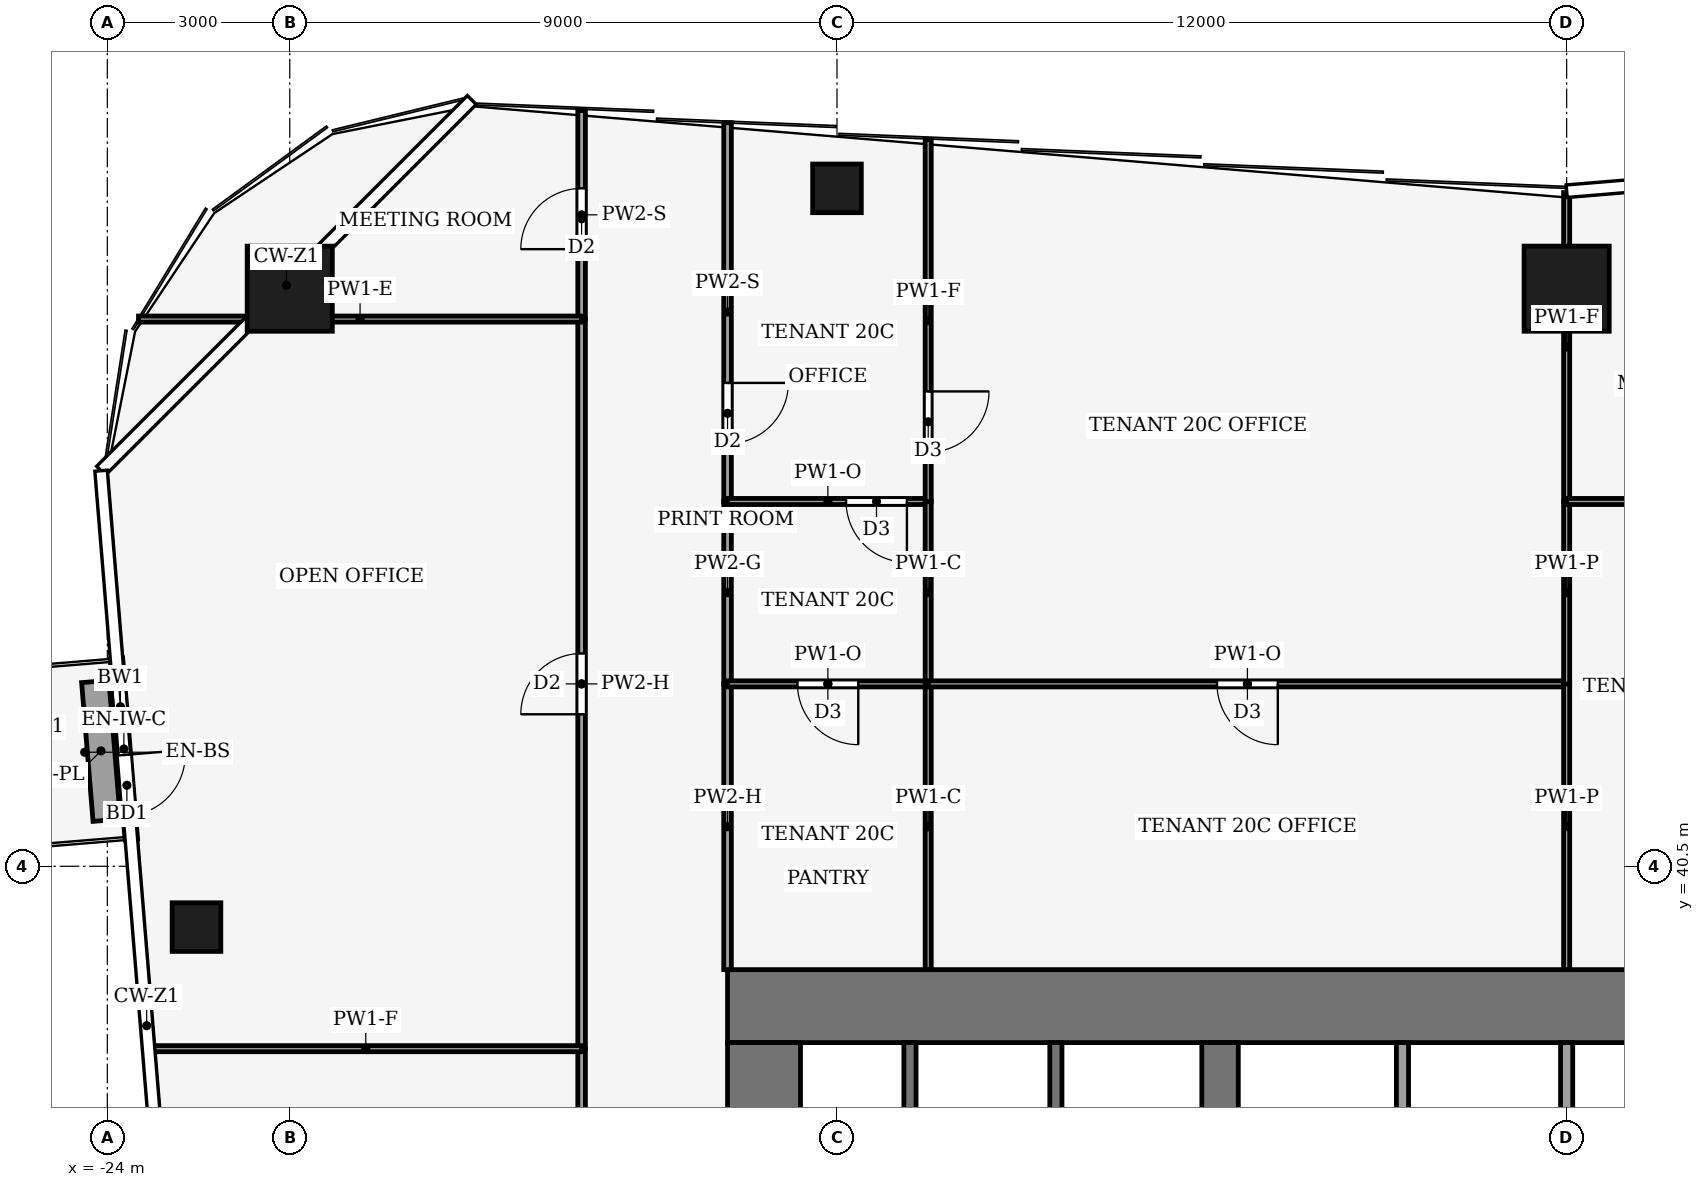
"""IFC4 building model, lengths in metres.
Left out: names, types, materials, properties, quantities, classifications, styles, units other than length and angle.
Written with IfcOpenShell. Run it as: python <this file> out.ifc"""

import sys

from ifc_helpers import new_model, si_unit, direction, frame, frame_2d, origin, origin_2d, place, context, subcontext, project, spatial, rectangle, hollow_rectangle, extrude, element, fill, save


model = new_model("IFC4")
c1 = context("Model", 3, precision=1e-05, world=origin(), true_north=direction((0.0, 1.0)))
c2 = subcontext(c1, "Body", "Model", "MODEL_VIEW")
j1 = project(units=[si_unit("LENGTHUNIT", "METRE"), si_unit("PLANEANGLEUNIT", "RADIAN")], contexts=[c1])
p1 = place(None, origin())
s1 = spatial("IfcSite", under=j1, at=p1, CompositionType="ELEMENT")
p2 = place(p1, origin())
s2 = spatial("IfcBuilding", under=s1, at=p2, CompositionType="ELEMENT")
p3 = place(p2, frame((0.0, 0.0, 90.0)))
s3 = spatial("IfcBuildingStorey", under=s2, at=p3, CompositionType="ELEMENT", Elevation=90.0)
p4 = place(p3, frame((-13.8, 38.2, -0.13), z_axis=(0.0, 0.0, 1.0), x_axis=(1.0, 0.0, 0.0)))
e1 = element("IfcWall", 1, at=p4, inside=s3, PredefinedType="SHEAR", context=c2, shape_type="SweptSolid", body=[
    extrude(rectangle(XDim=27.6, YDim=1.2, at=frame_2d((13.8, 0.0))), origin(), (0.0, 0.0, 1.0), 4.0),
])
p5 = place(p3, frame((-13.2, 18.4, -0.13), z_axis=(0.0, 0.0, 1.0), x_axis=(0.0, 1.0, 0.0)))
e2 = element("IfcWall", 2, at=p5, inside=s3, PredefinedType="SHEAR", context=c2, shape_type="SweptSolid", body=[
    extrude(rectangle(XDim=19.2, YDim=1.2, at=frame_2d((9.6, 0.0))), origin(), (0.0, 0.0, 1.0), 4.0),
])
p6 = place(p5, frame((2.8, 0.0, 0.13)))
e3 = element("IfcOpeningElement", 3, at=p6, cuts=e2, PredefinedType="OPENING", context=c2, shape_type="SweptSolid", body=[
    extrude(rectangle(XDim=2.4, YDim=2.4, at=frame_2d((1.2, 1.2))), frame((0.0, 0.61, 0.0), z_axis=(0.0, -1.0, 0.0), x_axis=(1.0, 0.0, 0.0)), (0.0, 0.0, 1.0), 1.22),
])
p7 = place(p5, frame((13.4, 0.0, 0.13)))
e4 = element("IfcOpeningElement", 4, at=p7, cuts=e2, PredefinedType="OPENING", context=c2, shape_type="SweptSolid", body=[
    extrude(rectangle(XDim=1.4, YDim=2.2, at=frame_2d((0.7, 1.1))), frame((0.0, 0.61, 0.0), z_axis=(0.0, -1.0, 0.0), x_axis=(1.0, 0.0, 0.0)), (0.0, 0.0, 1.0), 1.22),
])
p8 = place(p3, frame((-5.7, 18.4, -0.13), z_axis=(0.0, 0.0, 1.0), x_axis=(0.0, 1.0, 0.0)))
e5 = element("IfcWall", 5, at=p8, inside=s3, PredefinedType="SHEAR", context=c2, shape_type="SweptSolid", body=[
    extrude(rectangle(XDim=19.2, YDim=0.6, at=frame_2d((9.6, 0.0))), origin(), (0.0, 0.0, 1.0), 4.0),
])
p9 = place(p8, frame((8.35, 0.0, 0.13)))
e6 = element("IfcOpeningElement", 6, at=p9, cuts=e5, PredefinedType="OPENING", context=c2, shape_type="SweptSolid", body=[
    extrude(rectangle(XDim=0.9, YDim=2.1, at=frame_2d((0.45, 1.05))), frame((0.0, 0.31, 0.0), z_axis=(0.0, -1.0, 0.0), x_axis=(1.0, 0.0, 0.0)), (0.0, 0.0, 1.0), 0.62),
])
for number, where, z_axis, x_axis in (
    (7, (-21.0, 50.0, 0.0), (0.0, 0.0, 1.0), (1.0, 0.0, 0.0)),
    (8, (0.0, 50.0, 0.0), (0.0, 0.0, 1.0), (1.0, 0.0, 0.0)),
):
    element("IfcColumn", number, at=place(p3, frame(where, z_axis=z_axis, x_axis=x_axis)), inside=s3, PredefinedType="COLUMN", context=c2, shape_type="SweptSolid", body=[
        extrude(hollow_rectangle(XDim=1.4, YDim=1.4, WallThickness=0.08, at=origin_2d()), origin(), (0.0, 0.0, 1.0), 4.0),
    ])
for number, where, z_axis, x_axis in (
    (9, (-12.0, 51.65, 0.0), (0.0, 0.0, 1.0), (1.0, 0.0, 0.0)),
    (10, (-22.534, 39.5, 0.0), (0.0, 0.0, 1.0), (1.0, 0.0, 0.0)),
):
    element("IfcColumn", number, at=place(p3, frame(where, z_axis=z_axis, x_axis=x_axis)), inside=s3, PredefinedType="COLUMN", context=c2, shape_type="SweptSolid", body=[
        extrude(hollow_rectangle(XDim=0.8, YDim=0.8, WallThickness=0.04, at=origin_2d()), origin(), (0.0, 0.0, 1.0), 4.0),
    ])
p10 = place(p3, frame((-23.85, 43.919, 0.0), z_axis=(0.0, 0.0, 1.0), x_axis=(0.081903334605, -0.996640278024, 0.0)))
e11 = element("IfcWall", 11, at=p10, inside=s3, PredefinedType="SOLIDWALL", context=c2, shape_type="SweptSolid", body=[
    extrude(rectangle(XDim=2.99, YDim=0.206, at=frame_2d((1.495, 0.0))), origin(), (0.0, 0.0, 1.0), 3.65),
])
p11 = place(p10, frame((1.593, 0.0, 0.0)))
e12 = element("IfcOpeningElement", 12, at=p11, cuts=e11, PredefinedType="OPENING", context=c2, shape_type="SweptSolid", body=[
    extrude(rectangle(XDim=1.0, YDim=2.1, at=frame_2d((0.5, 1.05))), frame((0.0, 0.113, 0.0), z_axis=(0.0, -1.0, 0.0), x_axis=(1.0, 0.0, 0.0)), (0.0, 0.0, 1.0), 0.226),
])
p12 = place(p10, frame((0.396, 0.0, 0.9)))
e13 = element("IfcOpeningElement", 13, at=p12, cuts=e11, PredefinedType="OPENING", context=c2, shape_type="SweptSolid", body=[
    extrude(rectangle(XDim=0.8, YDim=1.2, at=frame_2d((0.4, 0.6))), frame((0.0, 0.113, 0.0), z_axis=(0.0, -1.0, 0.0), x_axis=(1.0, 0.0, 0.0)), (0.0, 0.0, 1.0), 0.226),
])
p13 = place(p3, frame((-24.198, 43.539, 0.0), z_axis=(0.0, 0.0, 1.0), x_axis=(0.081986639556, -0.996633428566, 0.0)))
e14 = element("IfcWall", 14, at=p13, inside=s3, PredefinedType="USERDEFINED", context=c2, shape_type="SweptSolid", body=[
    extrude(rectangle(XDim=2.29, YDim=0.45, at=frame_2d((1.145, 0.0))), origin(), (0.0, 0.0, 1.0), 0.4),
])
for number, where, z_axis, x_axis in (
    (15, (-10.8, 34.0, 0.0), (0.0, 0.0, 1.0), (0.0, 1.0, 0.0)),
    (16, (-8.4, 34.0, 0.0), (0.0, 0.0, 1.0), (0.0, 1.0, 0.0)),
    (17, (-2.7, 34.0, 0.0), (0.0, 0.0, 1.0), (0.0, 1.0, 0.0)),
    (18, (0.0, 34.0, 0.0), (0.0, 0.0, 1.0), (0.0, 1.0, 0.0)),
):
    element("IfcWall", number, at=place(p3, frame(where, z_axis=z_axis, x_axis=x_axis)), inside=s3, PredefinedType="PARTITIONING", context=c2, shape_type="SweptSolid", body=[
        extrude(rectangle(XDim=3.6, YDim=0.2, at=frame_2d((1.8, 0.0))), origin(), (0.0, 0.0, 1.0), 3.87),
    ])
p14 = place(p3, frame((-16.2, 25.5, 0.0), z_axis=(0.0, 0.0, 1.0), x_axis=(0.0, 1.0, 0.0)))
e19 = element("IfcWall", 19, at=p14, inside=s3, PredefinedType="PARTITIONING", context=c2, shape_type="SweptSolid", body=[
    extrude(rectangle(XDim=12.0, YDim=0.125, at=frame_2d((6.0, 0.0))), origin(), (0.0, 0.0, 1.0), 3.48),
])
p15 = place(p14, frame((5.5, 0.0, 0.0)))
e20 = element("IfcOpeningElement", 20, at=p15, cuts=e19, PredefinedType="OPENING", context=c2, shape_type="SweptSolid", body=[
    extrude(rectangle(XDim=1.0, YDim=2.1, at=frame_2d((0.5, 1.05))), frame((0.0, 0.073, 0.0), z_axis=(0.0, -1.0, 0.0), x_axis=(1.0, 0.0, 0.0)), (0.0, 0.0, 1.0), 0.145),
])
p16 = place(p3, frame((-16.2, 37.5, 0.0), z_axis=(0.0, 0.0, 1.0), x_axis=(0.0, 1.0, 0.0)))
e21 = element("IfcWall", 21, at=p16, inside=s3, PredefinedType="PARTITIONING", context=c2, shape_type="SweptSolid", body=[
    extrude(rectangle(XDim=12.0, YDim=0.125, at=frame_2d((6.0, 0.0))), origin(), (0.0, 0.0, 1.0), 3.14),
])
p17 = place(p16, frame((5.5, 0.0, 0.0)))
e22 = element("IfcOpeningElement", 22, at=p17, cuts=e21, PredefinedType="OPENING", context=c2, shape_type="SweptSolid", body=[
    extrude(rectangle(XDim=1.0, YDim=2.1, at=frame_2d((0.5, 1.05))), frame((0.0, 0.073, 0.0), z_axis=(0.0, -1.0, 0.0), x_axis=(1.0, 0.0, 0.0)), (0.0, 0.0, 1.0), 0.145),
])
p18 = place(p3, frame((-16.2, 49.5, 0.0), z_axis=(0.0, 0.0, 1.0), x_axis=(0.0, 1.0, 0.0)))
e23 = element("IfcWall", 23, at=p18, inside=s3, PredefinedType="PARTITIONING", context=c2, shape_type="SweptSolid", body=[
    extrude(rectangle(XDim=3.43, YDim=0.125, at=frame_2d((1.715, 0.0))), origin(), (0.0, 0.0, 1.0), 3.04),
])
p19 = place(p18, frame((1.15, 0.0, 0.0)))
e24 = element("IfcOpeningElement", 24, at=p19, cuts=e23, PredefinedType="OPENING", context=c2, shape_type="SweptSolid", body=[
    extrude(rectangle(XDim=1.0, YDim=2.1, at=frame_2d((0.5, 1.05))), frame((0.0, 0.073, 0.0), z_axis=(0.0, -1.0, 0.0), x_axis=(1.0, 0.0, 0.0)), (0.0, 0.0, 1.0), 0.145),
])
p20 = place(p3, frame((-13.8, 38.8, 0.0), z_axis=(0.0, 0.0, 1.0), x_axis=(0.0, 1.0, 0.0)))
e25 = element("IfcWall", 25, at=p20, inside=s3, PredefinedType="PARTITIONING", context=c2, shape_type="SweptSolid", body=[
    extrude(rectangle(XDim=4.7, YDim=0.125, at=frame_2d((2.35, 0.0))), origin(), (0.0, 0.0, 1.0), 3.14),
])
p21 = place(p3, frame((-13.8, 43.5, 0.0), z_axis=(0.0, 0.0, 1.0), x_axis=(0.0, 1.0, 0.0)))
e26 = element("IfcWall", 26, at=p21, inside=s3, PredefinedType="PARTITIONING", context=c2, shape_type="SweptSolid", body=[
    extrude(rectangle(XDim=3.0, YDim=0.125, at=frame_2d((1.5, 0.0))), origin(), (0.0, 0.0, 1.0), 3.87),
])
p22 = place(p3, frame((-13.8, 52.73, 0.0), z_axis=(0.0, 0.0, 1.0), x_axis=(0.0, -1.0, 0.0)))
e27 = element("IfcWall", 27, at=p22, inside=s3, PredefinedType="PARTITIONING", context=c2, shape_type="SweptSolid", body=[
    extrude(rectangle(XDim=6.23, YDim=0.125, at=frame_2d((3.115, 0.0))), origin(), (0.0, 0.0, 1.0), 3.04),
])
p23 = place(p22, frame((4.28, 0.0, 0.0)))
e28 = element("IfcOpeningElement", 28, at=p23, cuts=e27, PredefinedType="OPENING", context=c2, shape_type="SweptSolid", body=[
    extrude(rectangle(XDim=1.0, YDim=2.1, at=frame_2d((0.5, 1.05))), frame((0.0, 0.073, 0.0), z_axis=(0.0, -1.0, 0.0), x_axis=(1.0, 0.0, 0.0)), (0.0, 0.0, 1.0), 0.145),
])
p24 = place(p3, frame((-16.2, 37.5, 0.0), z_axis=(0.0, 0.0, 1.0), x_axis=(-1.0, 0.0, 0.0)))
e29 = element("IfcWall", 29, at=p24, inside=s3, PredefinedType="PARTITIONING", context=c2, shape_type="SweptSolid", body=[
    extrude(rectangle(XDim=7.099, YDim=0.1, at=frame_2d((3.55, 0.0))), origin(), (0.0, 0.0, 1.0), 3.04),
])
p25 = place(p3, frame((-16.2, 49.5, 0.0), z_axis=(0.0, 0.0, 1.0), x_axis=(-1.0, 0.0, 0.0)))
e30 = element("IfcWall", 30, at=p25, inside=s3, PredefinedType="PARTITIONING", context=c2, shape_type="SweptSolid", body=[
    extrude(rectangle(XDim=7.287, YDim=0.1, at=frame_2d((3.644, 0.0))), origin(), (0.0, 0.0, 1.0), 3.34),
])
p26 = place(p3, frame((-10.5, 43.5, 0.0), z_axis=(0.0, 0.0, 1.0), x_axis=(-1.0, 0.0, 0.0)))
e31 = element("IfcWall", 31, at=p26, inside=s3, PredefinedType="PARTITIONING", context=c2, shape_type="SweptSolid", body=[
    extrude(rectangle(XDim=3.3, YDim=0.1, at=frame_2d((1.65, 0.0))), origin(), (0.0, 0.0, 1.0), 3.39),
])
p27 = place(p26, frame((1.15, 0.0, 0.0)))
e32 = element("IfcOpeningElement", 32, at=p27, cuts=e31, PredefinedType="OPENING", context=c2, shape_type="SweptSolid", body=[
    extrude(rectangle(XDim=1.0, YDim=2.1, at=frame_2d((0.5, 1.05))), frame((0.0, 0.06, 0.0), z_axis=(0.0, -1.0, 0.0), x_axis=(1.0, 0.0, 0.0)), (0.0, 0.0, 1.0), 0.12),
])
p28 = place(p3, frame((-10.5, 38.8, 0.0), z_axis=(0.0, 0.0, 1.0), x_axis=(0.0, 1.0, 0.0)))
e33 = element("IfcWall", 33, at=p28, inside=s3, PredefinedType="PARTITIONING", context=c2, shape_type="SweptSolid", body=[
    extrude(rectangle(XDim=4.7, YDim=0.1, at=frame_2d((2.35, 0.0))), origin(), (0.0, 0.0, 1.0), 3.87),
])
p29 = place(p3, frame((-10.5, 46.5, 0.0), z_axis=(0.0, 0.0, 1.0), x_axis=(-1.0, 0.0, 0.0)))
e34 = element("IfcWall", 34, at=p29, inside=s3, PredefinedType="PARTITIONING", context=c2, shape_type="SweptSolid", body=[
    extrude(rectangle(XDim=3.3, YDim=0.1, at=frame_2d((1.65, 0.0))), origin(), (0.0, 0.0, 1.0), 3.39),
])
p30 = place(p29, frame((0.35, 0.0, 0.0)))
e35 = element("IfcOpeningElement", 35, at=p30, cuts=e34, PredefinedType="OPENING", context=c2, shape_type="SweptSolid", body=[
    extrude(rectangle(XDim=1.0, YDim=2.1, at=frame_2d((0.5, 1.05))), frame((0.0, 0.06, 0.0), z_axis=(0.0, -1.0, 0.0), x_axis=(1.0, 0.0, 0.0)), (0.0, 0.0, 1.0), 0.12),
])
p31 = place(p3, frame((-10.5, 43.5, 0.0), z_axis=(0.0, 0.0, 1.0), x_axis=(0.0, 1.0, 0.0)))
e36 = element("IfcWall", 36, at=p31, inside=s3, PredefinedType="PARTITIONING", context=c2, shape_type="SweptSolid", body=[
    extrude(rectangle(XDim=3.004, YDim=0.1, at=frame_2d((1.502, 0.0))), origin(), (0.0, 0.0, 1.0), 3.87),
])
p32 = place(p3, frame((-10.5, 52.455, 0.0), z_axis=(0.0, 0.0, 1.0), x_axis=(0.0, -1.0, 0.0)))
e37 = element("IfcWall", 37, at=p32, inside=s3, PredefinedType="PARTITIONING", context=c2, shape_type="SweptSolid", body=[
    extrude(rectangle(XDim=5.959, YDim=0.1, at=frame_2d((2.979, 0.0))), origin(), (0.0, 0.0, 1.0), 3.04),
])
p33 = place(p32, frame((4.145, 0.0, 0.0)))
e38 = element("IfcOpeningElement", 38, at=p33, cuts=e37, PredefinedType="OPENING", context=c2, shape_type="SweptSolid", body=[
    extrude(rectangle(XDim=1.0, YDim=2.1, at=frame_2d((0.5, 1.05))), frame((0.0, 0.06, 0.0), z_axis=(0.0, -1.0, 0.0), x_axis=(1.0, 0.0, 0.0)), (0.0, 0.0, 1.0), 0.12),
])
p34 = place(p3, frame((0.0, 43.5, 0.0), z_axis=(0.0, 0.0, 1.0), x_axis=(-1.0, 0.0, 0.0)))
e39 = element("IfcWall", 39, at=p34, inside=s3, PredefinedType="PARTITIONING", context=c2, shape_type="SweptSolid", body=[
    extrude(rectangle(XDim=10.5, YDim=0.1, at=frame_2d((5.25, 0.0))), origin(), (0.0, 0.0, 1.0), 3.39),
])
p35 = place(p34, frame((4.75, 0.0, 0.0)))
e40 = element("IfcOpeningElement", 40, at=p35, cuts=e39, PredefinedType="OPENING", context=c2, shape_type="SweptSolid", body=[
    extrude(rectangle(XDim=1.0, YDim=2.1, at=frame_2d((0.5, 1.05))), frame((0.0, 0.06, 0.0), z_axis=(0.0, -1.0, 0.0), x_axis=(1.0, 0.0, 0.0)), (0.0, 0.0, 1.0), 0.12),
])
p36 = place(p3, frame((0.0, 38.8, 0.0), z_axis=(0.0, 0.0, 1.0), x_axis=(0.0, 1.0, 0.0)))
e41 = element("IfcWall", 41, at=p36, inside=s3, PredefinedType="PARTITIONING", context=c2, shape_type="SweptSolid", body=[
    extrude(rectangle(XDim=4.704, YDim=0.1, at=frame_2d((2.352, 0.0))), origin(), (0.0, 0.0, 1.0), 3.44),
])
p37 = place(p3, frame((0.0, 43.496, 0.0), z_axis=(0.0, 0.0, 1.0), x_axis=(0.0, 1.0, 0.0)))
e42 = element("IfcWall", 42, at=p37, inside=s3, PredefinedType="PARTITIONING", context=c2, shape_type="SweptSolid", body=[
    extrude(rectangle(XDim=3.004, YDim=0.1, at=frame_2d((1.502, 0.0))), origin(), (0.0, 0.0, 1.0), 3.44),
])
p38 = place(p3, frame((0.0, 46.5, 0.0), z_axis=(0.0, 0.0, 1.0), x_axis=(0.0, 1.0, 0.0)))
e43 = element("IfcWall", 43, at=p38, inside=s3, PredefinedType="PARTITIONING", context=c2, shape_type="SweptSolid", body=[
    extrude(rectangle(XDim=5.08, YDim=0.1, at=frame_2d((2.54, 0.0))), origin(), (0.0, 0.0, 1.0), 3.04),
])
p39 = place(p3, frame((4.5, 46.5, 0.0), z_axis=(0.0, 0.0, 1.0), x_axis=(-1.0, 0.0, 0.0)))
e44 = element("IfcWall", 44, at=p39, inside=s3, PredefinedType="PARTITIONING", context=c2, shape_type="SweptSolid", body=[
    extrude(rectangle(XDim=4.5, YDim=0.1, at=frame_2d((2.25, 0.0))), origin(), (0.0, 0.0, 1.0), 3.39),
])
p40 = place(p11, origin())
e45 = element("IfcDoor", 45, at=p40, inside=s3, OperationType="SINGLE_SWING_RIGHT", PredefinedType="DOOR", context=c2, shape_type="SweptSolid", body=[
    extrude(rectangle(XDim=1.0, YDim=2.1, at=frame_2d((0.5, 1.05))), frame((0.0, 0.025, 0.0), z_axis=(0.0, -1.0, 0.0), x_axis=(1.0, 0.0, 0.0)), (0.0, 0.0, 1.0), 0.05),
])
fill(e12, e45)
p41 = place(p12, origin())
e46 = element("IfcWindow", 46, at=p41, inside=s3, PartitioningType="SINGLE_PANEL", PredefinedType="WINDOW", context=c2, shape_type="SweptSolid", body=[
    extrude(rectangle(XDim=0.8, YDim=1.2, at=frame_2d((0.4, 0.6))), frame((0.0, 0.03, 0.0), z_axis=(0.0, -1.0, 0.0), x_axis=(1.0, 0.0, 0.0)), (0.0, 0.0, 1.0), 0.06),
])
fill(e13, e46)
p42 = place(p17, origin())
e47 = element("IfcDoor", 47, at=p42, inside=s3, OperationType="SINGLE_SWING_LEFT", PredefinedType="DOOR", context=c2, shape_type="SweptSolid", body=[
    extrude(rectangle(XDim=1.0, YDim=2.1, at=frame_2d((0.5, 1.05))), frame((0.0, 0.025, 0.0), z_axis=(0.0, -1.0, 0.0), x_axis=(1.0, 0.0, 0.0)), (0.0, 0.0, 1.0), 0.05),
])
fill(e22, e47)
p43 = place(p19, origin())
e48 = element("IfcDoor", 48, at=p43, inside=s3, OperationType="SINGLE_SWING_LEFT", PredefinedType="DOOR", context=c2, shape_type="SweptSolid", body=[
    extrude(rectangle(XDim=1.0, YDim=2.1, at=frame_2d((0.5, 1.05))), frame((0.0, 0.025, 0.0), z_axis=(0.0, -1.0, 0.0), x_axis=(1.0, 0.0, 0.0)), (0.0, 0.0, 1.0), 0.05),
])
fill(e24, e48)
p44 = place(p23, origin())
e49 = element("IfcDoor", 49, at=p44, inside=s3, OperationType="SINGLE_SWING_RIGHT", PredefinedType="DOOR", context=c2, shape_type="SweptSolid", body=[
    extrude(rectangle(XDim=1.0, YDim=2.1, at=frame_2d((0.5, 1.05))), frame((0.0, 0.025, 0.0), z_axis=(0.0, -1.0, 0.0), x_axis=(1.0, 0.0, 0.0)), (0.0, 0.0, 1.0), 0.05),
])
fill(e28, e49)
p45 = place(p27, origin())
e50 = element("IfcDoor", 50, at=p45, inside=s3, OperationType="SINGLE_SWING_LEFT", PredefinedType="DOOR", context=c2, shape_type="SweptSolid", body=[
    extrude(rectangle(XDim=1.0, YDim=2.1, at=frame_2d((0.5, 1.05))), frame((0.0, 0.025, 0.0), z_axis=(0.0, -1.0, 0.0), x_axis=(1.0, 0.0, 0.0)), (0.0, 0.0, 1.0), 0.05),
])
fill(e32, e50)
p46 = place(p30, origin())
e51 = element("IfcDoor", 51, at=p46, inside=s3, OperationType="SINGLE_SWING_LEFT", PredefinedType="DOOR", context=c2, shape_type="SweptSolid", body=[
    extrude(rectangle(XDim=1.0, YDim=2.1, at=frame_2d((0.5, 1.05))), frame((0.0, 0.025, 0.0), z_axis=(0.0, -1.0, 0.0), x_axis=(1.0, 0.0, 0.0)), (0.0, 0.0, 1.0), 0.05),
])
fill(e35, e51)
p47 = place(p33, origin())
e52 = element("IfcDoor", 52, at=p47, inside=s3, OperationType="SINGLE_SWING_RIGHT", PredefinedType="DOOR", context=c2, shape_type="SweptSolid", body=[
    extrude(rectangle(XDim=1.0, YDim=2.1, at=frame_2d((0.5, 1.05))), frame((0.0, 0.025, 0.0), z_axis=(0.0, -1.0, 0.0), x_axis=(1.0, 0.0, 0.0)), (0.0, 0.0, 1.0), 0.05),
])
fill(e38, e52)
p48 = place(p35, origin())
e53 = element("IfcDoor", 53, at=p48, inside=s3, OperationType="SINGLE_SWING_RIGHT", PredefinedType="DOOR", context=c2, shape_type="SweptSolid", body=[
    extrude(rectangle(XDim=1.0, YDim=2.1, at=frame_2d((0.5, 1.05))), frame((0.0, 0.025, 0.0), z_axis=(0.0, -1.0, 0.0), x_axis=(1.0, 0.0, 0.0)), (0.0, 0.0, 1.0), 0.05),
])
fill(e40, e53)
save(model, sys.argv[1])
